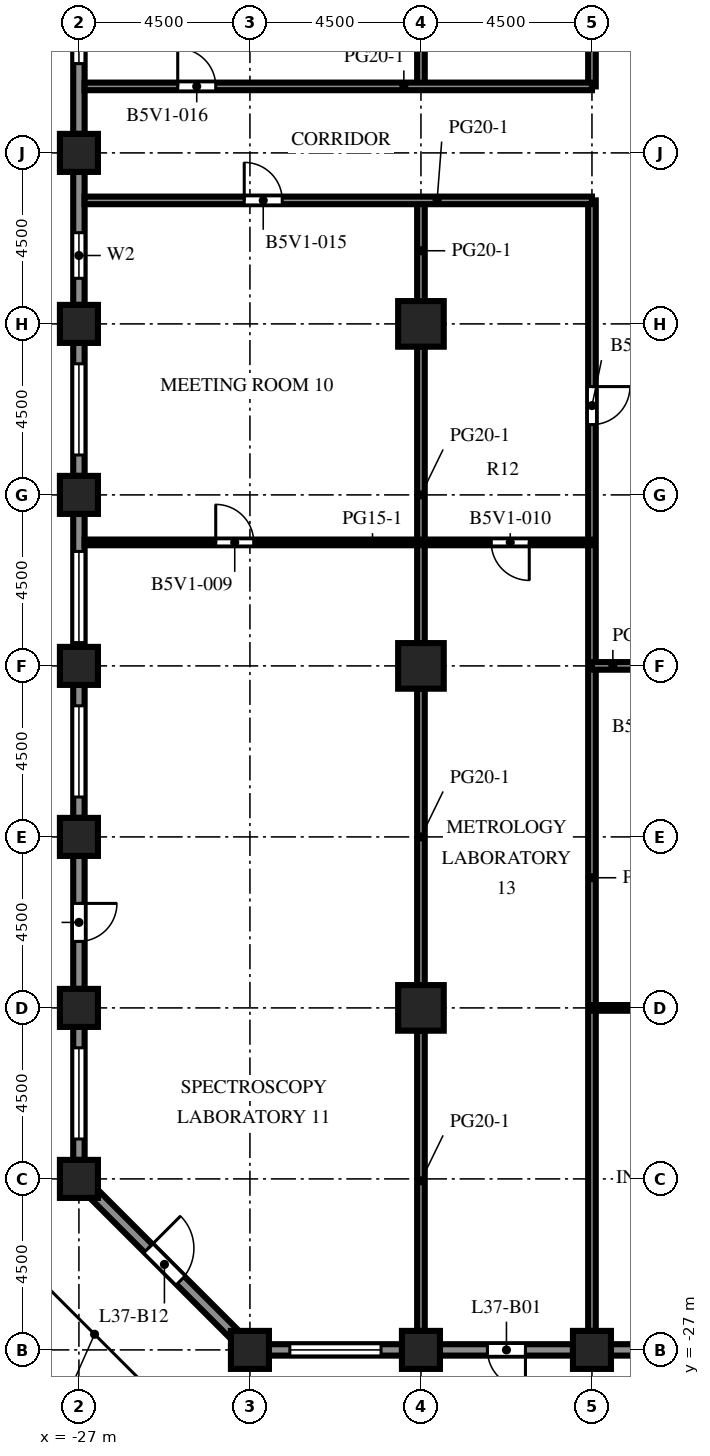
"""IFC4 building model, lengths in metres.
Left out: names, types, materials, properties, quantities, classifications, styles, units other than length and angle.
Written with IfcOpenShell. Run it as: python <this file> out.ifc"""

import sys

from ifc_helpers import new_model, si_unit, direction, frame, frame_2d, origin, origin_2d, place, context, subcontext, project, spatial, rectangle, extrude, element, fill, save


model = new_model("IFC4")
c1 = context("Model", 3, precision=1e-05, world=origin(), true_north=direction((0.0, 1.0)))
c2 = subcontext(c1, "Body", "Model", "MODEL_VIEW")
j1 = project(units=[si_unit("LENGTHUNIT", "METRE"), si_unit("PLANEANGLEUNIT", "RADIAN")], contexts=[c1])
p1 = place(None, origin())
s1 = spatial("IfcSite", under=j1, at=p1, CompositionType="ELEMENT")
p2 = place(p1, origin())
s2 = spatial("IfcBuilding", under=s1, at=p2, CompositionType="ELEMENT")
p3 = place(p2, frame((0.0, 0.0, 165.0)))
s3 = spatial("IfcBuildingStorey", under=s2, at=p3, CompositionType="ELEMENT", Elevation=165.0)
for number, where, z_axis, x_axis in (
    (1, (-27.0, -22.5, 0.0), (0.0, 0.0, 1.0), (1.0, 0.0, 0.0)),
    (2, (-27.0, -18.0, 0.0), (0.0, 0.0, 1.0), (1.0, 0.0, 0.0)),
    (3, (-27.0, -13.5, 0.0), (0.0, 0.0, 1.0), (1.0, 0.0, 0.0)),
    (4, (-27.0, -9.0, 0.0), (0.0, 0.0, 1.0), (1.0, 0.0, 0.0)),
    (5, (-27.0, -4.5, 0.0), (0.0, 0.0, 1.0), (1.0, 0.0, 0.0)),
    (6, (-27.0, 0.0, 0.0), (0.0, 0.0, 1.0), (1.0, 0.0, 0.0)),
    (7, (-27.0, 4.5, 0.0), (0.0, 0.0, 1.0), (1.0, 0.0, 0.0)),
    (8, (-22.5, -27.0, 0.0), (0.0, 0.0, 1.0), (1.0, 0.0, 0.0)),
    (9, (-18.0, -27.0, 0.0), (0.0, 0.0, 1.0), (1.0, 0.0, 0.0)),
    (10, (-13.5, -27.0, 0.0), (0.0, 0.0, 1.0), (1.0, 0.0, 0.0)),
):
    element("IfcColumn", number, at=place(p3, frame(where, z_axis=z_axis, x_axis=x_axis)), inside=s3, PredefinedType="COLUMN", context=c2, shape_type="SweptSolid", body=[
        extrude(rectangle(XDim=1.0, YDim=1.0, at=origin_2d()), origin(), (0.0, 0.0, 1.0), 4.1),
    ])
for number, where, z_axis, x_axis in (
    (11, (-18.0, -18.0, 0.0), (0.0, 0.0, 1.0), (1.0, 0.0, 0.0)),
    (12, (-18.0, -9.0, 0.0), (0.0, 0.0, 1.0), (1.0, 0.0, 0.0)),
    (13, (-18.0, 0.0, 0.0), (0.0, 0.0, 1.0), (1.0, 0.0, 0.0)),
):
    element("IfcColumn", number, at=place(p3, frame(where, z_axis=z_axis, x_axis=x_axis)), inside=s3, PredefinedType="COLUMN", context=c2, shape_type="SweptSolid", body=[
        extrude(rectangle(XDim=1.2, YDim=1.2, at=origin_2d()), origin(), (0.0, 0.0, 1.0), 4.1),
    ])
p4 = place(p3, frame((-18.5, -27.0, 0.0), z_axis=(0.0, 0.0, 1.0), x_axis=(-1.0, 0.0, 0.0)))
e14 = element("IfcWall", 14, at=p4, inside=s3, PredefinedType="SOLIDWALL", context=c2, shape_type="SweptSolid", body=[
    extrude(rectangle(XDim=3.5, YDim=0.3, at=frame_2d((1.75, 0.0))), origin(), (0.0, 0.0, 1.0), 2.85),
])
p5 = place(p4, frame((0.55, 0.0, 0.8)))
e15 = element("IfcOpeningElement", 15, at=p5, cuts=e14, PredefinedType="OPENING", context=c2, shape_type="SweptSolid", body=[
    extrude(rectangle(XDim=2.4, YDim=1.7, at=frame_2d((1.2, 0.85))), frame((0.0, 0.16, 0.0), z_axis=(0.0, -1.0, 0.0), x_axis=(1.0, 0.0, 0.0)), (0.0, 0.0, 1.0), 0.32),
])
p6 = place(p3, frame((-14.0, -27.0, 0.0), z_axis=(0.0, 0.0, 1.0), x_axis=(-1.0, 0.0, 0.0)))
e16 = element("IfcWall", 16, at=p6, inside=s3, PredefinedType="SOLIDWALL", context=c2, shape_type="SweptSolid", body=[
    extrude(rectangle(XDim=3.5, YDim=0.3, at=frame_2d((1.75, 0.0))), origin(), (0.0, 0.0, 1.0), 2.85),
])
p7 = place(p6, frame((1.25, 0.0, 0.0)))
e17 = element("IfcOpeningElement", 17, at=p7, cuts=e16, PredefinedType="OPENING", context=c2, shape_type="SweptSolid", body=[
    extrude(rectangle(XDim=1.0, YDim=2.2, at=frame_2d((0.5, 1.1))), frame((0.0, 0.16, 0.0), z_axis=(0.0, -1.0, 0.0), x_axis=(1.0, 0.0, 0.0)), (0.0, 0.0, 1.0), 0.32),
])
p8 = place(p3, frame((-9.5, -27.0, 0.0), z_axis=(0.0, 0.0, 1.0), x_axis=(-1.0, 0.0, 0.0)))
e18 = element("IfcWall", 18, at=p8, inside=s3, PredefinedType="SOLIDWALL", context=c2, shape_type="SweptSolid", body=[
    extrude(rectangle(XDim=3.5, YDim=0.3, at=frame_2d((1.75, 0.0))), origin(), (0.0, 0.0, 1.0), 2.85),
])
p9 = place(p8, frame((0.55, 0.0, 0.8)))
e19 = element("IfcOpeningElement", 19, at=p9, cuts=e18, PredefinedType="OPENING", context=c2, shape_type="SweptSolid", body=[
    extrude(rectangle(XDim=2.4, YDim=1.7, at=frame_2d((1.2, 0.85))), frame((0.0, 0.16, 0.0), z_axis=(0.0, -1.0, 0.0), x_axis=(1.0, 0.0, 0.0)), (0.0, 0.0, 1.0), 0.32),
])
p10 = place(p3, frame((-27.0, 5.0, 0.0), z_axis=(0.0, 0.0, 1.0), x_axis=(0.0, 1.0, 0.0)))
e20 = element("IfcWall", 20, at=p10, inside=s3, PredefinedType="SOLIDWALL", context=c2, shape_type="SweptSolid", body=[
    extrude(rectangle(XDim=3.5, YDim=0.3, at=frame_2d((1.75, 0.0))), origin(), (0.0, 0.0, 1.0), 2.85),
])
p11 = place(p10, frame((1.85, 0.0, 0.8)))
e21 = element("IfcOpeningElement", 21, at=p11, cuts=e20, PredefinedType="OPENING", context=c2, shape_type="SweptSolid", body=[
    extrude(rectangle(XDim=1.2, YDim=1.7, at=frame_2d((0.6, 0.85))), frame((0.0, 0.16, 0.0), z_axis=(0.0, -1.0, 0.0), x_axis=(1.0, 0.0, 0.0)), (0.0, 0.0, 1.0), 0.32),
])
p12 = place(p3, frame((-27.0, 0.5, 0.0), z_axis=(0.0, 0.0, 1.0), x_axis=(0.0, 1.0, 0.0)))
e22 = element("IfcWall", 22, at=p12, inside=s3, PredefinedType="SOLIDWALL", context=c2, shape_type="SweptSolid", body=[
    extrude(rectangle(XDim=3.5, YDim=0.3, at=frame_2d((1.75, 0.0))), origin(), (0.0, 0.0, 1.0), 2.85),
])
p13 = place(p12, frame((0.7, 0.0, 0.8)))
e23 = element("IfcOpeningElement", 23, at=p13, cuts=e22, PredefinedType="OPENING", context=c2, shape_type="SweptSolid", body=[
    extrude(rectangle(XDim=1.2, YDim=1.7, at=frame_2d((0.6, 0.85))), frame((0.0, 0.16, 0.0), z_axis=(0.0, -1.0, 0.0), x_axis=(1.0, 0.0, 0.0)), (0.0, 0.0, 1.0), 0.32),
])
p14 = place(p3, frame((-27.0, -4.0, 0.0), z_axis=(0.0, 0.0, 1.0), x_axis=(0.0, 1.0, 0.0)))
e24 = element("IfcWall", 24, at=p14, inside=s3, PredefinedType="SOLIDWALL", context=c2, shape_type="SweptSolid", body=[
    extrude(rectangle(XDim=3.5, YDim=0.3, at=frame_2d((1.75, 0.0))), origin(), (0.0, 0.0, 1.0), 2.85),
])
p15 = place(p14, frame((0.55, 0.0, 0.8)))
e25 = element("IfcOpeningElement", 25, at=p15, cuts=e24, PredefinedType="OPENING", context=c2, shape_type="SweptSolid", body=[
    extrude(rectangle(XDim=2.4, YDim=1.7, at=frame_2d((1.2, 0.85))), frame((0.0, 0.16, 0.0), z_axis=(0.0, -1.0, 0.0), x_axis=(1.0, 0.0, 0.0)), (0.0, 0.0, 1.0), 0.32),
])
p16 = place(p3, frame((-27.0, -8.5, 0.0), z_axis=(0.0, 0.0, 1.0), x_axis=(0.0, 1.0, 0.0)))
e26 = element("IfcWall", 26, at=p16, inside=s3, PredefinedType="SOLIDWALL", context=c2, shape_type="SweptSolid", body=[
    extrude(rectangle(XDim=3.5, YDim=0.3, at=frame_2d((1.75, 0.0))), origin(), (0.0, 0.0, 1.0), 2.85),
])
p17 = place(p16, frame((0.113, 0.0, 0.8)))
e27 = element("IfcOpeningElement", 27, at=p17, cuts=e26, PredefinedType="OPENING", context=c2, shape_type="SweptSolid", body=[
    extrude(rectangle(XDim=2.4, YDim=1.7, at=frame_2d((1.2, 0.85))), frame((0.0, 0.16, 0.0), z_axis=(0.0, -1.0, 0.0), x_axis=(1.0, 0.0, 0.0)), (0.0, 0.0, 1.0), 0.32),
])
p18 = place(p3, frame((-27.0, -13.0, 0.0), z_axis=(0.0, 0.0, 1.0), x_axis=(0.0, 1.0, 0.0)))
e28 = element("IfcWall", 28, at=p18, inside=s3, PredefinedType="SOLIDWALL", context=c2, shape_type="SweptSolid", body=[
    extrude(rectangle(XDim=3.5, YDim=0.3, at=frame_2d((1.75, 0.0))), origin(), (0.0, 0.0, 1.0), 2.85),
])
p19 = place(p18, frame((0.55, 0.0, 0.8)))
e29 = element("IfcOpeningElement", 29, at=p19, cuts=e28, PredefinedType="OPENING", context=c2, shape_type="SweptSolid", body=[
    extrude(rectangle(XDim=2.4, YDim=1.7, at=frame_2d((1.2, 0.85))), frame((0.0, 0.16, 0.0), z_axis=(0.0, -1.0, 0.0), x_axis=(1.0, 0.0, 0.0)), (0.0, 0.0, 1.0), 0.32),
])
p20 = place(p3, frame((-27.0, -17.5, 0.0), z_axis=(0.0, 0.0, 1.0), x_axis=(0.0, 1.0, 0.0)))
e30 = element("IfcWall", 30, at=p20, inside=s3, PredefinedType="SOLIDWALL", context=c2, shape_type="SweptSolid", body=[
    extrude(rectangle(XDim=3.5, YDim=0.3, at=frame_2d((1.75, 0.0))), origin(), (0.0, 0.0, 1.0), 2.85),
])
p21 = place(p20, frame((1.25, 0.0, 0.0)))
e31 = element("IfcOpeningElement", 31, at=p21, cuts=e30, PredefinedType="OPENING", context=c2, shape_type="SweptSolid", body=[
    extrude(rectangle(XDim=1.0, YDim=2.2, at=frame_2d((0.5, 1.1))), frame((0.0, 0.16, 0.0), z_axis=(0.0, -1.0, 0.0), x_axis=(1.0, 0.0, 0.0)), (0.0, 0.0, 1.0), 0.32),
])
p22 = place(p3, frame((-27.0, -22.0, 0.0), z_axis=(0.0, 0.0, 1.0), x_axis=(0.0, 1.0, 0.0)))
e32 = element("IfcWall", 32, at=p22, inside=s3, PredefinedType="SOLIDWALL", context=c2, shape_type="SweptSolid", body=[
    extrude(rectangle(XDim=3.5, YDim=0.3, at=frame_2d((1.75, 0.0))), origin(), (0.0, 0.0, 1.0), 2.85),
])
p23 = place(p22, frame((0.55, 0.0, 0.8)))
e33 = element("IfcOpeningElement", 33, at=p23, cuts=e32, PredefinedType="OPENING", context=c2, shape_type="SweptSolid", body=[
    extrude(rectangle(XDim=2.4, YDim=1.7, at=frame_2d((1.2, 0.85))), frame((0.0, 0.16, 0.0), z_axis=(0.0, -1.0, 0.0), x_axis=(1.0, 0.0, 0.0)), (0.0, 0.0, 1.0), 0.32),
])
p24 = place(p3, frame((-22.894, -26.606, 0.0), z_axis=(0.0, 0.0, 1.0), x_axis=(-0.707106781187, 0.707106781187, 0.0)))
e34 = element("IfcWall", 34, at=p24, inside=s3, PredefinedType="SOLIDWALL", context=c2, shape_type="SweptSolid", body=[
    extrude(rectangle(XDim=5.25, YDim=0.3, at=frame_2d((2.625, 0.0))), origin(), (0.0, 0.0, 1.0), 2.85),
])
p25 = place(p24, frame((2.025, 0.0, 0.0)))
e35 = element("IfcOpeningElement", 35, at=p25, cuts=e34, PredefinedType="OPENING", context=c2, shape_type="SweptSolid", body=[
    extrude(rectangle(XDim=1.2, YDim=2.2, at=frame_2d((0.6, 1.1))), frame((0.0, 0.16, 0.0), z_axis=(0.0, -1.0, 0.0), x_axis=(1.0, 0.0, 0.0)), (0.0, 0.0, 1.0), 0.32),
])
p26 = place(p3, frame((-18.0, -26.5, 0.0), z_axis=(0.0, 0.0, 1.0), x_axis=(0.0, 1.0, 0.0)))
e36 = element("IfcWall", 36, at=p26, inside=s3, PredefinedType="PARTITIONING", context=c2, shape_type="SweptSolid", body=[
    extrude(rectangle(XDim=7.9, YDim=0.2, at=frame_2d((3.95, 0.0))), origin(), (0.0, 0.0, 1.0), 3.65),
])
for number, where, z_axis, x_axis in (
    (37, (-18.0, -17.4, 0.0), (0.0, 0.0, 1.0), (0.0, 1.0, 0.0)),
    (38, (-18.0, -8.4, 0.0), (0.0, 0.0, 1.0), (0.0, 1.0, 0.0)),
):
    element("IfcWall", number, at=place(p3, frame(where, z_axis=z_axis, x_axis=x_axis)), inside=s3, PredefinedType="PARTITIONING", context=c2, shape_type="SweptSolid", body=[
        extrude(rectangle(XDim=7.8, YDim=0.2, at=frame_2d((3.9, 0.0))), origin(), (0.0, 0.0, 1.0), 3.65),
    ])
p27 = place(p3, frame((-18.0, 0.6, 0.0), z_axis=(0.0, 0.0, 1.0), x_axis=(0.0, 1.0, 0.0)))
e39 = element("IfcWall", 39, at=p27, inside=s3, PredefinedType="PARTITIONING", context=c2, shape_type="SweptSolid", body=[
    extrude(rectangle(XDim=2.65, YDim=0.2, at=frame_2d((1.325, 0.0))), origin(), (0.0, 0.0, 1.0), 3.65),
])
p28 = place(p3, frame((-18.0, 6.25, 0.0), z_axis=(0.0, 0.0, 1.0), x_axis=(0.0, 1.0, 0.0)))
e40 = element("IfcWall", 40, at=p28, inside=s3, PredefinedType="PARTITIONING", context=c2, shape_type="SweptSolid", body=[
    extrude(rectangle(XDim=2.15, YDim=0.2, at=frame_2d((1.075, 0.0))), origin(), (0.0, 0.0, 1.0), 3.65),
])
p29 = place(p3, frame((-13.5, -26.5, 0.0), z_axis=(0.0, 0.0, 1.0), x_axis=(0.0, 1.0, 0.0)))
e41 = element("IfcWall", 41, at=p29, inside=s3, PredefinedType="PARTITIONING", context=c2, shape_type="SweptSolid", body=[
    extrude(rectangle(XDim=29.75, YDim=0.2, at=frame_2d((14.875, 0.0))), origin(), (0.0, 0.0, 1.0), 3.65),
])
p30 = place(p29, frame((23.85, 0.0, 0.0)))
e42 = element("IfcOpeningElement", 42, at=p30, cuts=e41, PredefinedType="OPENING", context=c2, shape_type="SweptSolid", body=[
    extrude(rectangle(XDim=1.0, YDim=2.1, at=frame_2d((0.5, 1.05))), frame((0.0, 0.11, 0.0), z_axis=(0.0, -1.0, 0.0), x_axis=(1.0, 0.0, 0.0)), (0.0, 0.0, 1.0), 0.22),
])
p31 = place(p3, frame((-13.5, 6.25, 0.0), z_axis=(0.0, 0.0, 1.0), x_axis=(0.0, 1.0, 0.0)))
e43 = element("IfcWall", 43, at=p31, inside=s3, PredefinedType="PARTITIONING", context=c2, shape_type="SweptSolid", body=[
    extrude(rectangle(XDim=20.25, YDim=0.2, at=frame_2d((10.125, 0.0))), origin(), (0.0, 0.0, 1.0), 3.65),
])
p32 = place(p31, frame((3.85, 0.0, 0.0)))
e44 = element("IfcOpeningElement", 44, at=p32, cuts=e43, PredefinedType="OPENING", context=c2, shape_type="SweptSolid", body=[
    extrude(rectangle(XDim=1.0, YDim=2.1, at=frame_2d((0.5, 1.05))), frame((0.0, 0.11, 0.0), z_axis=(0.0, -1.0, 0.0), x_axis=(1.0, 0.0, 0.0)), (0.0, 0.0, 1.0), 0.22),
])
p33 = place(p3, frame((-13.5, -18.0, 0.0), z_axis=(0.0, 0.0, 1.0), x_axis=(1.0, 0.0, 0.0)))
e45 = element("IfcWall", 45, at=p33, inside=s3, PredefinedType="PARTITIONING", context=c2, shape_type="SweptSolid", body=[
    extrude(rectangle(XDim=3.9, YDim=0.15, at=frame_2d((1.95, 0.0))), origin(), (0.0, 0.0, 1.0), 3.65),
])
p34 = place(p3, frame((-10.5, -9.0, 0.0), z_axis=(0.0, 0.0, 1.0), x_axis=(-1.0, 0.0, 0.0)))
e46 = element("IfcWall", 46, at=p34, inside=s3, PredefinedType="PARTITIONING", context=c2, shape_type="SweptSolid", body=[
    extrude(rectangle(XDim=3.0, YDim=0.2, at=frame_2d((1.5, 0.0))), origin(), (0.0, 0.0, 1.0), 3.65),
])
p35 = place(p34, frame((0.9, 0.0, 0.0)))
e47 = element("IfcOpeningElement", 47, at=p35, cuts=e46, PredefinedType="OPENING", context=c2, shape_type="SweptSolid", body=[
    extrude(rectangle(XDim=1.0, YDim=2.1, at=frame_2d((0.5, 1.05))), frame((0.0, 0.11, 0.0), z_axis=(0.0, -1.0, 0.0), x_axis=(1.0, 0.0, 0.0)), (0.0, 0.0, 1.0), 0.22),
])
p36 = place(p3, frame((-13.5, -5.75, 0.0), z_axis=(0.0, 0.0, 1.0), x_axis=(-1.0, 0.0, 0.0)))
e48 = element("IfcWall", 48, at=p36, inside=s3, PredefinedType="PARTITIONING", context=c2, shape_type="SweptSolid", body=[
    extrude(rectangle(XDim=13.35, YDim=0.15, at=frame_2d((6.675, 0.0))), origin(), (0.0, 0.0, 1.0), 3.65),
])
p37 = place(p36, frame((8.9, 0.0, 0.0)))
e49 = element("IfcOpeningElement", 49, at=p37, cuts=e48, PredefinedType="OPENING", context=c2, shape_type="SweptSolid", body=[
    extrude(rectangle(XDim=1.0, YDim=2.1, at=frame_2d((0.5, 1.05))), frame((0.0, 0.085, 0.0), z_axis=(0.0, -1.0, 0.0), x_axis=(1.0, 0.0, 0.0)), (0.0, 0.0, 1.0), 0.17),
])
p38 = place(p36, frame((1.65, 0.0, 0.0)))
e50 = element("IfcOpeningElement", 50, at=p38, cuts=e48, PredefinedType="OPENING", context=c2, shape_type="SweptSolid", body=[
    extrude(rectangle(XDim=1.0, YDim=2.1, at=frame_2d((0.5, 1.05))), frame((0.0, 0.085, 0.0), z_axis=(0.0, -1.0, 0.0), x_axis=(1.0, 0.0, 0.0)), (0.0, 0.0, 1.0), 0.17),
])
p39 = place(p3, frame((-13.5, 3.25, 0.0), z_axis=(0.0, 0.0, 1.0), x_axis=(-1.0, 0.0, 0.0)))
e51 = element("IfcWall", 51, at=p39, inside=s3, PredefinedType="PARTITIONING", context=c2, shape_type="SweptSolid", body=[
    extrude(rectangle(XDim=13.35, YDim=0.2, at=frame_2d((6.675, 0.0))), origin(), (0.0, 0.0, 1.0), 3.65),
])
p40 = place(p39, frame((8.15, 0.0, 0.0)))
e52 = element("IfcOpeningElement", 52, at=p40, cuts=e51, PredefinedType="OPENING", context=c2, shape_type="SweptSolid", body=[
    extrude(rectangle(XDim=1.0, YDim=2.1, at=frame_2d((0.5, 1.05))), frame((0.0, 0.11, 0.0), z_axis=(0.0, -1.0, 0.0), x_axis=(1.0, 0.0, 0.0)), (0.0, 0.0, 1.0), 0.22),
])
p41 = place(p3, frame((-26.85, 6.25, 0.0), z_axis=(0.0, 0.0, 1.0), x_axis=(1.0, 0.0, 0.0)))
e53 = element("IfcWall", 53, at=p41, inside=s3, PredefinedType="PARTITIONING", context=c2, shape_type="SweptSolid", body=[
    extrude(rectangle(XDim=13.35, YDim=0.2, at=frame_2d((6.675, 0.0))), origin(), (0.0, 0.0, 1.0), 3.65),
])
p42 = place(p41, frame((2.45, 0.0, 0.0)))
e54 = element("IfcOpeningElement", 54, at=p42, cuts=e53, PredefinedType="OPENING", context=c2, shape_type="SweptSolid", body=[
    extrude(rectangle(XDim=1.0, YDim=2.1, at=frame_2d((0.5, 1.05))), frame((0.0, 0.11, 0.0), z_axis=(0.0, -1.0, 0.0), x_axis=(1.0, 0.0, 0.0)), (0.0, 0.0, 1.0), 0.22),
])
p43 = place(p5, origin())
e55 = element("IfcWindow", 55, at=p43, inside=s3, PartitioningType="SINGLE_PANEL", PredefinedType="WINDOW", context=c2, shape_type="SweptSolid", body=[
    extrude(rectangle(XDim=2.4, YDim=1.7, at=frame_2d((1.2, 0.85))), frame((0.0, 0.03, 0.0), z_axis=(0.0, -1.0, 0.0), x_axis=(1.0, 0.0, 0.0)), (0.0, 0.0, 1.0), 0.06),
])
fill(e15, e55)
p44 = place(p7, origin())
e56 = element("IfcDoor", 56, at=p44, inside=s3, OperationType="SINGLE_SWING_LEFT", PredefinedType="DOOR", context=c2, shape_type="SweptSolid", body=[
    extrude(rectangle(XDim=1.0, YDim=2.2, at=frame_2d((0.5, 1.1))), frame((0.0, 0.025, 0.0), z_axis=(0.0, -1.0, 0.0), x_axis=(1.0, 0.0, 0.0)), (0.0, 0.0, 1.0), 0.05),
])
fill(e17, e56)
p45 = place(p11, origin())
e57 = element("IfcWindow", 57, at=p45, inside=s3, PartitioningType="SINGLE_PANEL", PredefinedType="WINDOW", context=c2, shape_type="SweptSolid", body=[
    extrude(rectangle(XDim=1.2, YDim=1.7, at=frame_2d((0.6, 0.85))), frame((0.0, 0.03, 0.0), z_axis=(0.0, -1.0, 0.0), x_axis=(1.0, 0.0, 0.0)), (0.0, 0.0, 1.0), 0.06),
])
fill(e21, e57)
p46 = place(p13, origin())
e58 = element("IfcWindow", 58, at=p46, inside=s3, PartitioningType="SINGLE_PANEL", PredefinedType="WINDOW", context=c2, shape_type="SweptSolid", body=[
    extrude(rectangle(XDim=1.2, YDim=1.7, at=frame_2d((0.6, 0.85))), frame((0.0, 0.03, 0.0), z_axis=(0.0, -1.0, 0.0), x_axis=(1.0, 0.0, 0.0)), (0.0, 0.0, 1.0), 0.06),
])
fill(e23, e58)
p47 = place(p15, origin())
e59 = element("IfcWindow", 59, at=p47, inside=s3, PartitioningType="SINGLE_PANEL", PredefinedType="WINDOW", context=c2, shape_type="SweptSolid", body=[
    extrude(rectangle(XDim=2.4, YDim=1.7, at=frame_2d((1.2, 0.85))), frame((0.0, 0.03, 0.0), z_axis=(0.0, -1.0, 0.0), x_axis=(1.0, 0.0, 0.0)), (0.0, 0.0, 1.0), 0.06),
])
fill(e25, e59)
p48 = place(p17, origin())
e60 = element("IfcWindow", 60, at=p48, inside=s3, PartitioningType="SINGLE_PANEL", PredefinedType="WINDOW", context=c2, shape_type="SweptSolid", body=[
    extrude(rectangle(XDim=2.4, YDim=1.7, at=frame_2d((1.2, 0.85))), frame((0.0, 0.03, 0.0), z_axis=(0.0, -1.0, 0.0), x_axis=(1.0, 0.0, 0.0)), (0.0, 0.0, 1.0), 0.06),
])
fill(e27, e60)
p49 = place(p19, origin())
e61 = element("IfcWindow", 61, at=p49, inside=s3, PartitioningType="SINGLE_PANEL", PredefinedType="WINDOW", context=c2, shape_type="SweptSolid", body=[
    extrude(rectangle(XDim=2.4, YDim=1.7, at=frame_2d((1.2, 0.85))), frame((0.0, 0.03, 0.0), z_axis=(0.0, -1.0, 0.0), x_axis=(1.0, 0.0, 0.0)), (0.0, 0.0, 1.0), 0.06),
])
fill(e29, e61)
p50 = place(p21, origin())
e62 = element("IfcDoor", 62, at=p50, inside=s3, OperationType="SINGLE_SWING_RIGHT", PredefinedType="DOOR", context=c2, shape_type="SweptSolid", body=[
    extrude(rectangle(XDim=1.0, YDim=2.2, at=frame_2d((0.5, 1.1))), frame((0.0, 0.025, 0.0), z_axis=(0.0, -1.0, 0.0), x_axis=(1.0, 0.0, 0.0)), (0.0, 0.0, 1.0), 0.05),
])
fill(e31, e62)
p51 = place(p23, origin())
e63 = element("IfcWindow", 63, at=p51, inside=s3, PartitioningType="SINGLE_PANEL", PredefinedType="WINDOW", context=c2, shape_type="SweptSolid", body=[
    extrude(rectangle(XDim=2.4, YDim=1.7, at=frame_2d((1.2, 0.85))), frame((0.0, 0.03, 0.0), z_axis=(0.0, -1.0, 0.0), x_axis=(1.0, 0.0, 0.0)), (0.0, 0.0, 1.0), 0.06),
])
fill(e33, e63)
p52 = place(p25, origin())
e64 = element("IfcDoor", 64, at=p52, inside=s3, OperationType="SINGLE_SWING_RIGHT", PredefinedType="DOOR", context=c2, shape_type="SweptSolid", body=[
    extrude(rectangle(XDim=1.2, YDim=2.2, at=frame_2d((0.6, 1.1))), frame((0.0, 0.025, 0.0), z_axis=(0.0, -1.0, 0.0), x_axis=(1.0, 0.0, 0.0)), (0.0, 0.0, 1.0), 0.05),
])
fill(e35, e64)
p53 = place(p30, origin())
e65 = element("IfcDoor", 65, at=p53, inside=s3, OperationType="SINGLE_SWING_RIGHT", PredefinedType="DOOR", context=c2, shape_type="SweptSolid", body=[
    extrude(rectangle(XDim=1.0, YDim=2.1, at=frame_2d((0.5, 1.05))), frame((0.0, 0.025, 0.0), z_axis=(0.0, -1.0, 0.0), x_axis=(1.0, 0.0, 0.0)), (0.0, 0.0, 1.0), 0.05),
])
fill(e42, e65)
p54 = place(p37, origin())
e66 = element("IfcDoor", 66, at=p54, inside=s3, OperationType="SINGLE_SWING_RIGHT", PredefinedType="DOOR", context=c2, shape_type="SweptSolid", body=[
    extrude(rectangle(XDim=1.0, YDim=2.1, at=frame_2d((0.5, 1.05))), frame((0.0, 0.025, 0.0), z_axis=(0.0, -1.0, 0.0), x_axis=(1.0, 0.0, 0.0)), (0.0, 0.0, 1.0), 0.05),
])
fill(e49, e66)
p55 = place(p38, origin())
e67 = element("IfcDoor", 67, at=p55, inside=s3, OperationType="SINGLE_SWING_LEFT", PredefinedType="DOOR", context=c2, shape_type="SweptSolid", body=[
    extrude(rectangle(XDim=1.0, YDim=2.1, at=frame_2d((0.5, 1.05))), frame((0.0, 0.025, 0.0), z_axis=(0.0, -1.0, 0.0), x_axis=(1.0, 0.0, 0.0)), (0.0, 0.0, 1.0), 0.05),
])
fill(e50, e67)
p56 = place(p40, origin())
e68 = element("IfcDoor", 68, at=p56, inside=s3, OperationType="SINGLE_SWING_RIGHT", PredefinedType="DOOR", context=c2, shape_type="SweptSolid", body=[
    extrude(rectangle(XDim=1.0, YDim=2.1, at=frame_2d((0.5, 1.05))), frame((0.0, 0.025, 0.0), z_axis=(0.0, -1.0, 0.0), x_axis=(1.0, 0.0, 0.0)), (0.0, 0.0, 1.0), 0.05),
])
fill(e52, e68)
p57 = place(p42, origin())
e69 = element("IfcDoor", 69, at=p57, inside=s3, OperationType="SINGLE_SWING_LEFT", PredefinedType="DOOR", context=c2, shape_type="SweptSolid", body=[
    extrude(rectangle(XDim=1.0, YDim=2.1, at=frame_2d((0.5, 1.05))), frame((0.0, 0.025, 0.0), z_axis=(0.0, -1.0, 0.0), x_axis=(1.0, 0.0, 0.0)), (0.0, 0.0, 1.0), 0.05),
])
fill(e54, e69)
save(model, sys.argv[1])
